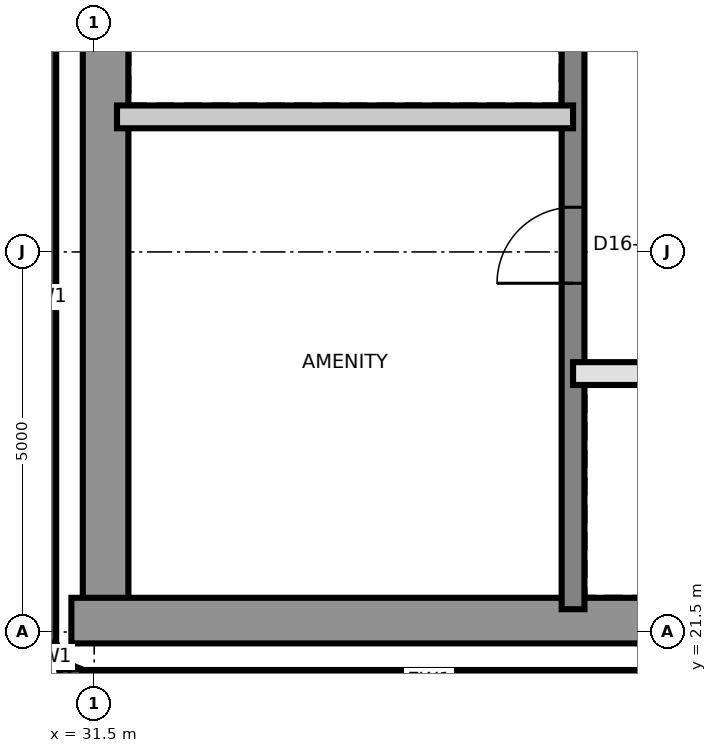
"""IFC4 building model, lengths in metres.
Left out: names, types, materials, properties, quantities, classifications, styles, units other than length and angle.
Written with IfcOpenShell. Run it as: python <this file> out.ifc"""

import sys

from ifc_helpers import new_model, si_unit, direction, frame, frame_2d, origin, place, context, subcontext, project, spatial, rectangle, extrude, element, fill, save


model = new_model("IFC4")
c1 = context("Model", 3, precision=1e-05, world=origin(), true_north=direction((0.0, 1.0)))
c2 = subcontext(c1, "Body", "Model", "MODEL_VIEW")
j1 = project(units=[si_unit("LENGTHUNIT", "METRE"), si_unit("PLANEANGLEUNIT", "RADIAN")], contexts=[c1])
p1 = place(None, origin())
s1 = spatial("IfcSite", under=j1, at=p1, CompositionType="ELEMENT")
p2 = place(p1, origin())
s2 = spatial("IfcBuilding", under=s1, at=p2, CompositionType="ELEMENT")
p3 = place(p2, frame((0.0, 0.0, 164.4)))
s3 = spatial("IfcBuildingStorey", under=s2, at=p3, CompositionType="ELEMENT", Elevation=164.4)
p4 = place(p3, frame((31.65, 21.8, 0.0), z_axis=(0.0, 0.0, 1.0), x_axis=(0.0, 1.0, 0.0)))
e1 = element("IfcWall", 1, at=p4, inside=s3, PredefinedType="SHEAR", context=c2, shape_type="SweptSolid", body=[
    extrude(rectangle(XDim=17.4, YDim=0.6, at=frame_2d((8.7, 0.0))), origin(), (0.0, 0.0, 1.0), 3.7),
])
p5 = place(p3, frame((31.2, 21.65, 0.0), z_axis=(0.0, 0.0, 1.0), x_axis=(1.0, 0.0, 0.0)))
e2 = element("IfcWall", 2, at=p5, inside=s3, PredefinedType="SHEAR", context=c2, shape_type="SweptSolid", body=[
    extrude(rectangle(XDim=27.0, YDim=0.6, at=frame_2d((13.5, 0.0))), origin(), (0.0, 0.0, 1.0), 3.7),
])
p6 = place(p3, frame((37.8, 21.8, 0.0), z_axis=(0.0, 0.0, 1.0), x_axis=(0.0, 1.0, 0.0)))
e3 = element("IfcWall", 3, at=p6, inside=s3, PredefinedType="SHEAR", context=c2, shape_type="SweptSolid", body=[
    extrude(rectangle(XDim=8.7, YDim=0.3, at=frame_2d((4.35, 0.0))), origin(), (0.0, 0.0, 1.0), 3.7),
])
p7 = place(p6, frame((4.288, 0.0, 0.0)))
e4 = element("IfcOpeningElement", 4, at=p7, cuts=e3, PredefinedType="OPENING", context=c2, shape_type="SweptSolid", body=[
    extrude(rectangle(XDim=1.0, YDim=2.1, at=frame_2d((0.5, 1.05))), frame((0.0, 0.16, 0.0), z_axis=(0.0, -1.0, 0.0), x_axis=(1.0, 0.0, 0.0)), (0.0, 0.0, 1.0), 0.32),
])
p8 = place(p3, frame((30.85, 30.454, 0.0), z_axis=(0.0, 0.0, 1.0), x_axis=(0.0, -1.0, 0.0)))
e5 = element("IfcWall", 5, at=p8, inside=s3, PredefinedType="SOLIDWALL", context=c2, shape_type="SweptSolid", body=[
    extrude(rectangle(XDim=9.094, YDim=0.3, at=frame_2d((4.547, 0.0))), origin(), (0.0, 0.0, 1.0), 3.4),
])
for number, where, z_axis, x_axis in (
    (6, (30.861, 21.302, 0.0), (0.0, 0.0, 1.0), (0.383, -0.924, 0.0)),
    (7, (31.048, 20.967, 0.0), (0.0, 0.0, 1.0), (0.924, -0.383, 0.0)),
):
    element("IfcWall", number, at=place(p3, frame(where, z_axis=z_axis, x_axis=x_axis)), inside=s3, PredefinedType="SOLIDWALL", context=c2, shape_type="SweptSolid", body=[
        extrude(rectangle(XDim=0.275, YDim=0.3, at=frame_2d((0.138, 0.0))), origin(), (0.0, 0.0, 1.0), 3.4),
    ])
p9 = place(p3, frame((31.36, 20.85, 0.0), z_axis=(0.0, 0.0, 1.0), x_axis=(1.0, 0.0, 0.0)))
e8 = element("IfcWall", 8, at=p9, inside=s3, PredefinedType="SOLIDWALL", context=c2, shape_type="SweptSolid", body=[
    extrude(rectangle(XDim=9.094, YDim=0.3, at=frame_2d((4.547, 0.0))), origin(), (0.0, 0.0, 1.0), 3.4),
])
p10 = place(p3, frame((37.8, 24.9, 0.0), z_axis=(0.0, 0.0, 1.0), x_axis=(1.0, 0.0, 0.0)))
e9 = element("IfcWall", 9, at=p10, inside=s3, PredefinedType="SOLIDWALL", context=c2, shape_type="SweptSolid", body=[
    extrude(rectangle(XDim=12.0, YDim=0.3, at=frame_2d((6.0, 0.0))), origin(), (0.0, 0.0, 1.0), 3.4),
])
p11 = place(p10, frame((1.05, 0.0, 0.0)))
e10 = element("IfcOpeningElement", 10, at=p11, cuts=e9, PredefinedType="OPENING", context=c2, shape_type="SweptSolid", body=[
    extrude(rectangle(XDim=0.9, YDim=2.1, at=frame_2d((0.45, 1.05))), frame((0.0, 0.16, 0.0), z_axis=(0.0, -1.0, 0.0), x_axis=(1.0, 0.0, 0.0)), (0.0, 0.0, 1.0), 0.32),
])
p12 = place(p10, frame((10.05, 0.0, 0.0)))
e11 = element("IfcOpeningElement", 11, at=p12, cuts=e9, PredefinedType="OPENING", context=c2, shape_type="SweptSolid", body=[
    extrude(rectangle(XDim=0.9, YDim=2.1, at=frame_2d((0.45, 1.05))), frame((0.0, 0.16, 0.0), z_axis=(0.0, -1.0, 0.0), x_axis=(1.0, 0.0, 0.0)), (0.0, 0.0, 1.0), 0.32),
])
p13 = place(p10, frame((3.95, 0.0, 0.0)))
e12 = element("IfcOpeningElement", 12, at=p13, cuts=e9, PredefinedType="OPENING", context=c2, shape_type="SweptSolid", body=[
    extrude(rectangle(XDim=1.1, YDim=2.4, at=frame_2d((0.55, 1.2))), frame((0.0, 0.16, 0.0), z_axis=(0.0, -1.0, 0.0), x_axis=(1.0, 0.0, 0.0)), (0.0, 0.0, 1.0), 0.32),
])
p14 = place(p10, frame((6.95, 0.0, 0.0)))
e13 = element("IfcOpeningElement", 13, at=p14, cuts=e9, PredefinedType="OPENING", context=c2, shape_type="SweptSolid", body=[
    extrude(rectangle(XDim=1.1, YDim=2.4, at=frame_2d((0.55, 1.2))), frame((0.0, 0.16, 0.0), z_axis=(0.0, -1.0, 0.0), x_axis=(1.0, 0.0, 0.0)), (0.0, 0.0, 1.0), 0.32),
])
p15 = place(p3, frame((31.8, 28.277, 0.0), z_axis=(0.0, 0.0, 1.0), x_axis=(1.0, 0.0, 0.0)))
e14 = element("IfcWall", 14, at=p15, inside=s3, PredefinedType="PARTITIONING", context=c2, shape_type="SweptSolid", body=[
    extrude(rectangle(XDim=6.0, YDim=0.3, at=frame_2d((3.0, 0.0))), origin(), (0.0, 0.0, 1.0), 3.4),
])
p16 = place(p7, origin())
e15 = element("IfcDoor", 15, at=p16, inside=s3, OperationType="SINGLE_SWING_RIGHT", PredefinedType="DOOR", context=c2, shape_type="SweptSolid", body=[
    extrude(rectangle(XDim=1.0, YDim=2.1, at=frame_2d((0.5, 1.05))), frame((0.0, 0.025, 0.0), z_axis=(0.0, -1.0, 0.0), x_axis=(1.0, 0.0, 0.0)), (0.0, 0.0, 1.0), 0.05),
])
fill(e4, e15)
save(model, sys.argv[1])
